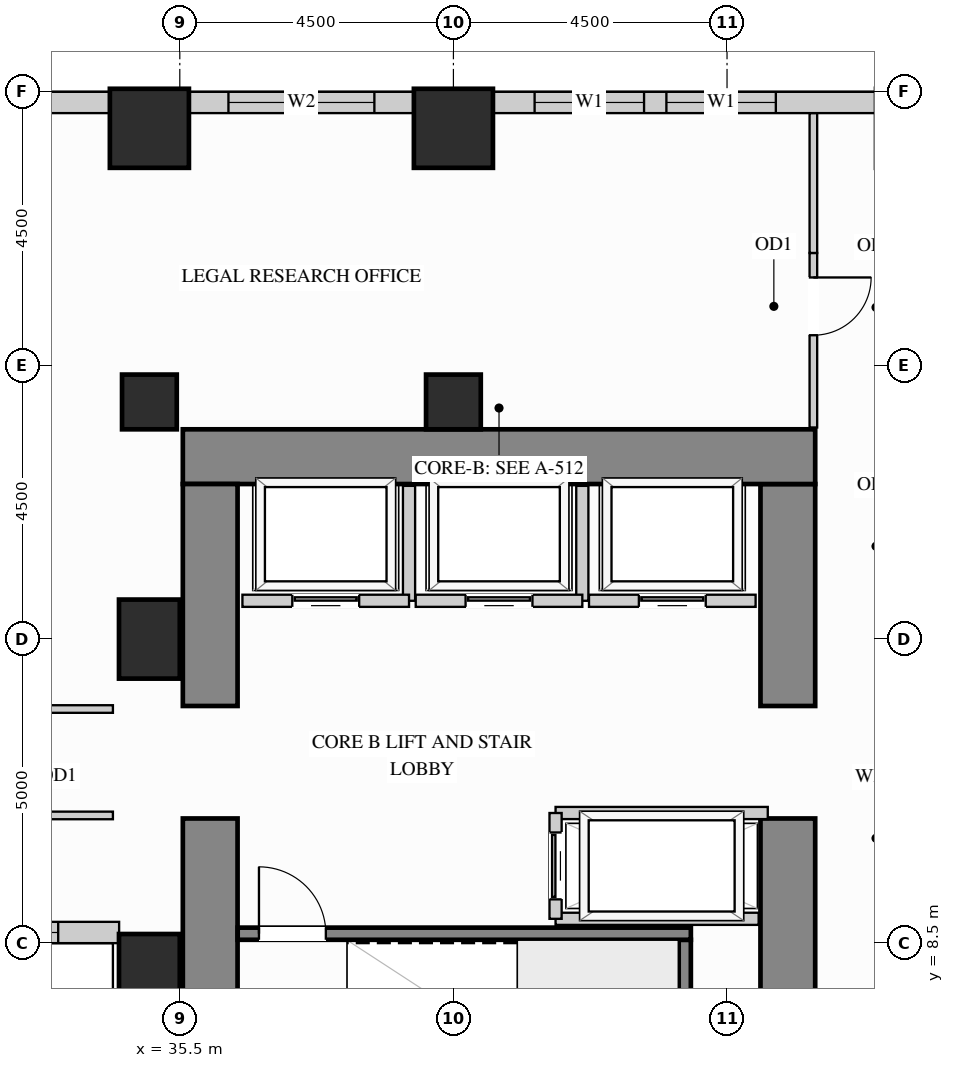
"""IFC4 building model, lengths in metres.
Left out: names, types, materials, properties, quantities, classifications, styles, units other than length and angle.
Written with IfcOpenShell. Run it as: python <this file> out.ifc"""

import sys

from ifc_helpers import new_model, si_unit, direction, frame, frame_2d, origin, origin_2d, place, context, subcontext, project, spatial, rectangle, extrude, source, transform, mapped, element, fill, save


model = new_model("IFC4")
c1 = context("Model", 3, precision=1e-05, world=origin(), true_north=direction((0.0, 1.0)))
c2 = subcontext(c1, "Body", "Model", "MODEL_VIEW")
j1 = project(units=[si_unit("LENGTHUNIT", "METRE"), si_unit("PLANEANGLEUNIT", "RADIAN")], contexts=[c1])
p1 = place(None, origin())
s1 = spatial("IfcSite", under=j1, at=p1, CompositionType="ELEMENT")
p2 = place(p1, origin())
s2 = spatial("IfcBuilding", under=s1, at=p2, CompositionType="ELEMENT")
p3 = place(p2, frame((0.0, 0.0, 51.3)))
s3 = spatial("IfcBuildingStorey", under=s2, at=p3, CompositionType="ELEMENT", Elevation=51.3)
m1 = source(origin(), c2, "Body", "SweptSolid", [
    extrude(rectangle(XDim=0.9, YDim=0.9, at=origin_2d()), origin(), (0.0, 0.0, 1.0), 3.38),
])
for number, where, z_axis, x_axis in (
    (1, (35.0, 17.4, 0.0), (0.0, 0.0, 1.0), (1.0, 0.0, 0.0)),
    (2, (40.0, 17.4, 0.0), (0.0, 0.0, 1.0), (1.0, 0.0, 0.0)),
):
    element("IfcColumn", number, at=place(p3, frame(where, z_axis=z_axis, x_axis=x_axis)), inside=s3, PredefinedType="COLUMN", context=c2, shape_type="MappedRepresentation", body=[
        mapped(m1, transform((0.0, 0.0, 0.0), x_axis=(1.0, 0.0, 0.0), y_axis=(0.0, 1.0, 0.0), z_axis=(0.0, 0.0, 1.0))),
    ])
m2 = source(origin(), c2, "Body", "SweptSolid", [
    extrude(rectangle(XDim=1.0, YDim=1.3, at=origin_2d()), origin(), (0.0, 0.0, 1.0), 3.38),
])
for number, where, z_axis, x_axis in (
    (3, (35.0, 13.5, 0.0), (0.0, 0.0, 1.0), (1.0, 0.0, 0.0)),
    (4, (35.0, 8.0, 0.0), (0.0, 0.0, 1.0), (1.0, 0.0, 0.0)),
):
    element("IfcColumn", number, at=place(p3, frame(where, z_axis=z_axis, x_axis=x_axis)), inside=s3, PredefinedType="COLUMN", context=c2, shape_type="MappedRepresentation", body=[
        mapped(m2, transform((0.0, 0.0, 0.0), x_axis=(1.0, 0.0, 0.0), y_axis=(0.0, 1.0, 0.0), z_axis=(0.0, 0.0, 1.0))),
    ])
m3 = source(origin(), c2, "Body", "SweptSolid", [
    extrude(rectangle(XDim=1.3, YDim=1.3, at=origin_2d()), origin(), (0.0, 0.0, 1.0), 3.38),
])
for number, where, z_axis, x_axis in (
    (5, (35.0, 21.9, 0.0), (0.0, 0.0, 1.0), (1.0, 0.0, 0.0)),
    (6, (40.0, 21.9, 0.0), (0.0, 0.0, 1.0), (1.0, 0.0, 0.0)),
):
    element("IfcColumn", number, at=place(p3, frame(where, z_axis=z_axis, x_axis=x_axis)), inside=s3, PredefinedType="COLUMN", context=c2, shape_type="MappedRepresentation", body=[
        mapped(m3, transform((0.0, 0.0, 0.0), x_axis=(1.0, 0.0, 0.0), y_axis=(0.0, 1.0, 0.0), z_axis=(0.0, 0.0, 1.0))),
    ])
m4 = source(origin(), c2, "Body", "SweptSolid", [
    extrude(rectangle(XDim=5.6, YDim=0.9, at=frame_2d((2.8, 0.0))), origin(), (0.0, 0.0, 1.0), 3.38),
])
p4 = place(p3, frame((45.5, 4.95, 0.0), z_axis=(0.0, 0.0, 1.0), x_axis=(0.0, 1.0, 0.0)))
e7 = element("IfcWall", 7, at=p4, inside=s3, PredefinedType="SHEAR", context=c2, shape_type="MappedRepresentation", body=[
    mapped(m4, transform((0.0, 0.0, 0.0), x_axis=(1.0, 0.0, 0.0), y_axis=(0.0, 1.0, 0.0), z_axis=(0.0, 0.0, 1.0))),
])
m5 = source(origin(), c2, "Body", "SweptSolid", [
    extrude(rectangle(XDim=3.65, YDim=0.9, at=frame_2d((1.825, 0.0))), origin(), (0.0, 0.0, 1.0), 3.38),
])
p5 = place(p3, frame((45.5, 12.4, 0.0), z_axis=(0.0, 0.0, 1.0), x_axis=(0.0, 1.0, 0.0)))
e8 = element("IfcWall", 8, at=p5, inside=s3, PredefinedType="SHEAR", context=c2, shape_type="MappedRepresentation", body=[
    mapped(m5, transform((0.0, 0.0, 0.0), x_axis=(1.0, 0.0, 0.0), y_axis=(0.0, 1.0, 0.0), z_axis=(0.0, 0.0, 1.0))),
])
m6 = source(origin(), c2, "Body", "SweptSolid", [
    extrude(rectangle(XDim=10.4, YDim=0.9, at=frame_2d((5.2, 0.0))), origin(), (0.0, 0.0, 1.0), 3.38),
])
p6 = place(p3, frame((35.55, 16.5, 0.0), z_axis=(0.0, 0.0, 1.0), x_axis=(1.0, 0.0, 0.0)))
e9 = element("IfcWall", 9, at=p6, inside=s3, PredefinedType="SHEAR", context=c2, shape_type="MappedRepresentation", body=[
    mapped(m6, transform((0.0, 0.0, 0.0), x_axis=(1.0, 0.0, 0.0), y_axis=(0.0, 1.0, 0.0), z_axis=(0.0, 0.0, 1.0))),
])
p7 = place(p3, frame((36.0, 4.95, 0.0), z_axis=(0.0, 0.0, 1.0), x_axis=(0.0, 1.0, 0.0)))
e10 = element("IfcWall", 10, at=p7, inside=s3, PredefinedType="SHEAR", context=c2, shape_type="MappedRepresentation", body=[
    mapped(m4, transform((0.0, 0.0, 0.0), x_axis=(1.0, 0.0, 0.0), y_axis=(0.0, 1.0, 0.0), z_axis=(0.0, 0.0, 1.0))),
])
p8 = place(p3, frame((36.0, 12.4, 0.0), z_axis=(0.0, 0.0, 1.0), x_axis=(0.0, 1.0, 0.0)))
e11 = element("IfcWall", 11, at=p8, inside=s3, PredefinedType="SHEAR", context=c2, shape_type="MappedRepresentation", body=[
    mapped(m5, transform((0.0, 0.0, 0.0), x_axis=(1.0, 0.0, 0.0), y_axis=(0.0, 1.0, 0.0), z_axis=(0.0, 0.0, 1.0))),
])
p9 = place(p3, frame((30.998, 8.675, 0.0), z_axis=(0.0, 0.0, 1.0), x_axis=(1.0, 0.0, 0.0)))
e12 = element("IfcWall", 12, at=p9, inside=s3, PredefinedType="SOLIDWALL", context=c2, shape_type="SweptSolid", body=[
    extrude(rectangle(XDim=3.504, YDim=0.35, at=frame_2d((1.752, 0.0))), origin(), (0.0, 0.0, 1.0), 3.365),
])
p10 = place(p9, frame((1.002, 0.0, 0.78)))
e13 = element("IfcOpeningElement", 13, at=p10, cuts=e12, PredefinedType="OPENING", context=c2, shape_type="SweptSolid", body=[
    extrude(rectangle(XDim=1.5, YDim=2.0, at=frame_2d((0.75, 1.0))), frame((0.0, 0.185, 0.0), z_axis=(0.0, -1.0, 0.0), x_axis=(1.0, 0.0, 0.0)), (0.0, 0.0, 1.0), 0.37),
])
p11 = place(p3, frame((46.952, 22.325, 0.0), z_axis=(0.0, 0.0, 1.0), x_axis=(-1.0, 0.0, 0.0)))
e14 = element("IfcWall", 14, at=p11, inside=s3, PredefinedType="SOLIDWALL", context=c2, shape_type="SweptSolid", body=[
    extrude(rectangle(XDim=6.304, YDim=0.35, at=frame_2d((3.152, 0.0))), origin(), (0.0, 0.0, 1.0), 2.51),
])
p12 = place(p11, frame((1.649, 0.0, 0.78)))
e15 = element("IfcOpeningElement", 15, at=p12, cuts=e14, PredefinedType="OPENING", context=c2, shape_type="SweptSolid", body=[
    extrude(rectangle(XDim=1.8, YDim=1.55, at=frame_2d((0.9, 0.775))), frame((0.0, 0.185, 0.0), z_axis=(0.0, -1.0, 0.0), x_axis=(1.0, 0.0, 0.0)), (0.0, 0.0, 1.0), 0.37),
])
p13 = place(p11, frame((3.817, 0.0, 0.78)))
e16 = element("IfcOpeningElement", 16, at=p13, cuts=e14, PredefinedType="OPENING", context=c2, shape_type="SweptSolid", body=[
    extrude(rectangle(XDim=1.8, YDim=1.55, at=frame_2d((0.9, 0.775))), frame((0.0, 0.185, 0.0), z_axis=(0.0, -1.0, 0.0), x_axis=(1.0, 0.0, 0.0)), (0.0, 0.0, 1.0), 0.37),
])
p14 = place(p3, frame((39.352, 22.325, 0.0), z_axis=(0.0, 0.0, 1.0), x_axis=(-1.0, 0.0, 0.0)))
e17 = element("IfcWall", 17, at=p14, inside=s3, PredefinedType="SOLIDWALL", context=c2, shape_type="SweptSolid", body=[
    extrude(rectangle(XDim=3.704, YDim=0.35, at=frame_2d((1.852, 0.0))), origin(), (0.0, 0.0, 1.0), 2.51),
])
p15 = place(p14, frame((0.652, 0.0, 0.78)))
e18 = element("IfcOpeningElement", 18, at=p15, cuts=e17, PredefinedType="OPENING", context=c2, shape_type="SweptSolid", body=[
    extrude(rectangle(XDim=2.4, YDim=1.55, at=frame_2d((1.2, 0.775))), frame((0.0, 0.185, 0.0), z_axis=(0.0, -1.0, 0.0), x_axis=(1.0, 0.0, 0.0)), (0.0, 0.0, 1.0), 0.37),
])
p16 = place(p3, frame((34.352, 22.325, 0.0), z_axis=(0.0, 0.0, 1.0), x_axis=(-1.0, 0.0, 0.0)))
e19 = element("IfcWall", 19, at=p16, inside=s3, PredefinedType="SOLIDWALL", context=c2, shape_type="SweptSolid", body=[
    extrude(rectangle(XDim=14.854, YDim=0.35, at=frame_2d((7.427, 0.0))), origin(), (0.0, 0.0, 1.0), 3.365),
])
p17 = place(p16, frame((4.058, 0.0, 0.78)))
e20 = element("IfcOpeningElement", 20, at=p17, cuts=e19, PredefinedType="OPENING", context=c2, shape_type="SweptSolid", body=[
    extrude(rectangle(XDim=1.5, YDim=2.0, at=frame_2d((0.75, 1.0))), frame((0.0, 0.185, 0.0), z_axis=(0.0, -1.0, 0.0), x_axis=(1.0, 0.0, 0.0)), (0.0, 0.0, 1.0), 0.37),
])
p18 = place(p16, frame((9.296, 0.0, 0.78)))
e21 = element("IfcOpeningElement", 21, at=p18, cuts=e19, PredefinedType="OPENING", context=c2, shape_type="SweptSolid", body=[
    extrude(rectangle(XDim=1.5, YDim=2.0, at=frame_2d((0.75, 1.0))), frame((0.0, 0.185, 0.0), z_axis=(0.0, -1.0, 0.0), x_axis=(1.0, 0.0, 0.0)), (0.0, 0.0, 1.0), 0.37),
])
p19 = place(p3, frame((45.92, 16.98, 0.0), z_axis=(0.0, 0.0, 1.0), x_axis=(0.0, 1.0, 0.0)))
e22 = element("IfcWall", 22, at=p19, inside=s3, PredefinedType="PARTITIONING", context=c2, shape_type="SweptSolid", body=[
    extrude(rectangle(XDim=2.87, YDim=0.125, at=frame_2d((1.435, 0.0))), origin(), (0.0, 0.0, 1.0), 3.365),
])
p20 = place(p19, frame((1.517, 0.0, 0.0)))
e23 = element("IfcOpeningElement", 23, at=p20, cuts=e22, PredefinedType="OPENING", context=c2, shape_type="SweptSolid", body=[
    extrude(rectangle(XDim=0.95, YDim=2.15, at=frame_2d((0.475, 1.075))), frame((0.0, 0.073, 0.0), z_axis=(0.0, -1.0, 0.0), x_axis=(1.0, 0.0, 0.0)), (0.0, 0.0, 1.0), 0.145),
])
m7 = source(origin(), c2, "Body", "SweptSolid", [
    extrude(rectangle(XDim=2.298, YDim=0.125, at=frame_2d((1.149, 0.0))), origin(), (0.0, 0.0, 1.0), 3.365),
])
p21 = place(p3, frame((45.92, 19.85, 0.0), z_axis=(0.0, 0.0, 1.0), x_axis=(0.0, 1.0, 0.0)))
e24 = element("IfcWall", 24, at=p21, inside=s3, PredefinedType="PARTITIONING", context=c2, shape_type="MappedRepresentation", body=[
    mapped(m7, transform((0.0, 0.0, 0.0), x_axis=(1.0, 0.0, 0.0), y_axis=(0.0, 1.0, 0.0), z_axis=(0.0, 0.0, 1.0))),
])
p22 = place(p3, frame((29.85, 12.35, 0.0), z_axis=(0.0, 0.0, 1.0), x_axis=(1.0, 0.0, 0.0)))
e25 = element("IfcWall", 25, at=p22, inside=s3, PredefinedType="PARTITIONING", context=c2, shape_type="SweptSolid", body=[
    extrude(rectangle(XDim=4.55, YDim=0.125, at=frame_2d((2.275, 0.0))), origin(), (0.0, 0.0, 1.0), 3.365),
])
p23 = place(p22, frame((1.8, 0.0, 0.0)))
e26 = element("IfcOpeningElement", 26, at=p23, cuts=e25, PredefinedType="OPENING", context=c2, shape_type="SweptSolid", body=[
    extrude(rectangle(XDim=0.95, YDim=2.15, at=frame_2d((0.475, 1.075))), frame((0.0, 0.073, 0.0), z_axis=(0.0, -1.0, 0.0), x_axis=(1.0, 0.0, 0.0)), (0.0, 0.0, 1.0), 0.145),
])
p24 = place(p3, frame((29.85, 10.6, 0.0), z_axis=(0.0, 0.0, 1.0), x_axis=(1.0, 0.0, 0.0)))
e27 = element("IfcWall", 27, at=p24, inside=s3, PredefinedType="PARTITIONING", context=c2, shape_type="SweptSolid", body=[
    extrude(rectangle(XDim=4.55, YDim=0.125, at=frame_2d((2.275, 0.0))), origin(), (0.0, 0.0, 1.0), 3.365),
])
p25 = place(p24, frame((1.8, 0.0, 0.0)))
e28 = element("IfcOpeningElement", 28, at=p25, cuts=e27, PredefinedType="OPENING", context=c2, shape_type="SweptSolid", body=[
    extrude(rectangle(XDim=0.95, YDim=2.15, at=frame_2d((0.475, 1.075))), frame((0.0, 0.073, 0.0), z_axis=(0.0, -1.0, 0.0), x_axis=(1.0, 0.0, 0.0)), (0.0, 0.0, 1.0), 0.145),
])
m8 = source(origin(), c2, "Body", "SweptSolid", [
    extrude(rectangle(XDim=1.89, YDim=0.2, at=frame_2d((0.945, 0.0))), origin(), (0.0, 0.0, 1.0), 3.365),
])
p26 = place(p3, frame((39.27, 14.13, 0.0), z_axis=(0.0, 0.0, 1.0), x_axis=(0.0, 1.0, 0.0)))
e29 = element("IfcWall", 29, at=p26, inside=s3, PredefinedType="PARTITIONING", context=c2, shape_type="MappedRepresentation", body=[
    mapped(m8, transform((0.0, 0.0, 0.0), x_axis=(1.0, 0.0, 0.0), y_axis=(0.0, 1.0, 0.0), z_axis=(0.0, 0.0, 1.0))),
])
p27 = place(p3, frame((36.53, 14.13, 0.0), z_axis=(0.0, 0.0, 1.0), x_axis=(1.0, 0.0, 0.0)))
e30 = element("IfcWall", 30, at=p27, inside=s3, PredefinedType="PARTITIONING", context=c2, shape_type="SweptSolid", body=[
    extrude(rectangle(XDim=2.74, YDim=0.2, at=frame_2d((1.37, 0.0))), origin(), (0.0, 0.0, 1.0), 3.365),
])
p28 = place(p27, frame((0.82, 0.0, 0.0)))
e31 = element("IfcOpeningElement", 31, at=p28, cuts=e30, PredefinedType="OPENING", context=c2, shape_type="SweptSolid", body=[
    extrude(rectangle(XDim=1.1, YDim=2.2, at=frame_2d((0.55, 1.1))), frame((0.0, 0.11, 0.0), z_axis=(0.0, -1.0, 0.0), x_axis=(1.0, 0.0, 0.0)), (0.0, 0.0, 1.0), 0.22),
])
p29 = place(p3, frame((42.12, 14.13, 0.0), z_axis=(0.0, 0.0, 1.0), x_axis=(0.0, 1.0, 0.0)))
e32 = element("IfcWall", 32, at=p29, inside=s3, PredefinedType="PARTITIONING", context=c2, shape_type="MappedRepresentation", body=[
    mapped(m8, transform((0.0, 0.0, 0.0), x_axis=(1.0, 0.0, 0.0), y_axis=(0.0, 1.0, 0.0), z_axis=(0.0, 0.0, 1.0))),
])
p30 = place(p3, frame((39.38, 14.13, 0.0), z_axis=(0.0, 0.0, 1.0), x_axis=(1.0, 0.0, 0.0)))
e33 = element("IfcWall", 33, at=p30, inside=s3, PredefinedType="PARTITIONING", context=c2, shape_type="SweptSolid", body=[
    extrude(rectangle(XDim=2.74, YDim=0.2, at=frame_2d((1.37, 0.0))), origin(), (0.0, 0.0, 1.0), 3.365),
])
p31 = place(p30, frame((0.82, 0.0, 0.0)))
e34 = element("IfcOpeningElement", 34, at=p31, cuts=e33, PredefinedType="OPENING", context=c2, shape_type="SweptSolid", body=[
    extrude(rectangle(XDim=1.1, YDim=2.2, at=frame_2d((0.55, 1.1))), frame((0.0, 0.11, 0.0), z_axis=(0.0, -1.0, 0.0), x_axis=(1.0, 0.0, 0.0)), (0.0, 0.0, 1.0), 0.22),
])
p32 = place(p3, frame((42.23, 14.13, 0.0), z_axis=(0.0, 0.0, 1.0), x_axis=(1.0, 0.0, 0.0)))
e35 = element("IfcWall", 35, at=p32, inside=s3, PredefinedType="PARTITIONING", context=c2, shape_type="SweptSolid", body=[
    extrude(rectangle(XDim=2.74, YDim=0.2, at=frame_2d((1.37, 0.0))), origin(), (0.0, 0.0, 1.0), 3.365),
])
p33 = place(p32, frame((0.82, 0.0, 0.0)))
e36 = element("IfcOpeningElement", 36, at=p33, cuts=e35, PredefinedType="OPENING", context=c2, shape_type="SweptSolid", body=[
    extrude(rectangle(XDim=1.1, YDim=2.2, at=frame_2d((0.55, 1.1))), frame((0.0, 0.11, 0.0), z_axis=(0.0, -1.0, 0.0), x_axis=(1.0, 0.0, 0.0)), (0.0, 0.0, 1.0), 0.22),
])
m9 = source(origin(), c2, "Body", "SweptSolid", [
    extrude(rectangle(XDim=3.49, YDim=0.2, at=frame_2d((1.745, 0.0))), origin(), (0.0, 0.0, 1.0), 3.365),
])
p34 = place(p3, frame((41.68, 10.64, 0.0), z_axis=(0.0, 0.0, 1.0), x_axis=(1.0, 0.0, 0.0)))
e37 = element("IfcWall", 37, at=p34, inside=s3, PredefinedType="PARTITIONING", context=c2, shape_type="MappedRepresentation", body=[
    mapped(m9, transform((0.0, 0.0, 0.0), x_axis=(1.0, 0.0, 0.0), y_axis=(0.0, 1.0, 0.0), z_axis=(0.0, 0.0, 1.0))),
])
m10 = source(origin(), c2, "Body", "SweptSolid", [
    extrude(rectangle(XDim=3.34, YDim=0.2, at=frame_2d((1.67, 0.0))), origin(), (0.0, 0.0, 1.0), 3.365),
])
p35 = place(p3, frame((41.68, 8.9, 0.0), z_axis=(0.0, 0.0, 1.0), x_axis=(1.0, 0.0, 0.0)))
e38 = element("IfcWall", 38, at=p35, inside=s3, PredefinedType="PARTITIONING", context=c2, shape_type="MappedRepresentation", body=[
    mapped(m10, transform((0.0, 0.0, 0.0), x_axis=(1.0, 0.0, 0.0), y_axis=(0.0, 1.0, 0.0), z_axis=(0.0, 0.0, 1.0))),
])
p36 = place(p3, frame((41.68, 8.9, 0.0), z_axis=(0.0, 0.0, 1.0), x_axis=(0.0, 1.0, 0.0)))
e39 = element("IfcWall", 39, at=p36, inside=s3, PredefinedType="PARTITIONING", context=c2, shape_type="SweptSolid", body=[
    extrude(rectangle(XDim=1.74, YDim=0.2, at=frame_2d((0.87, 0.0))), origin(), (0.0, 0.0, 1.0), 3.365),
])
p37 = place(p36, frame((0.32, 0.0, 0.0)))
e40 = element("IfcOpeningElement", 40, at=p37, cuts=e39, PredefinedType="OPENING", context=c2, shape_type="SweptSolid", body=[
    extrude(rectangle(XDim=1.1, YDim=2.2, at=frame_2d((0.55, 1.1))), frame((0.0, 0.11, 0.0), z_axis=(0.0, -1.0, 0.0), x_axis=(1.0, 0.0, 0.0)), (0.0, 0.0, 1.0), 0.22),
])
m11 = source(origin(), c2, "Body", "SweptSolid", [
    extrude(rectangle(XDim=3.603, YDim=0.2, at=frame_2d((1.802, 0.0))), origin(), (0.0, 0.0, 1.0), 3.38),
])
p38 = place(p3, frame((43.805, 4.952, 0.0), z_axis=(0.0, 0.0, 1.0), x_axis=(0.0, 1.0, 0.0)))
e41 = element("IfcWall", 41, at=p38, inside=s3, PredefinedType="SHEAR", context=c2, shape_type="MappedRepresentation", body=[
    mapped(m11, transform((0.0, 0.0, 0.0), x_axis=(1.0, 0.0, 0.0), y_axis=(0.0, 1.0, 0.0), z_axis=(0.0, 0.0, 1.0))),
])
p39 = place(p3, frame((36.452, 8.655, 0.0), z_axis=(0.0, 0.0, 1.0), x_axis=(1.0, 0.0, 0.0)))
e42 = element("IfcWall", 42, at=p39, inside=s3, PredefinedType="SHEAR", context=c2, shape_type="SweptSolid", body=[
    extrude(rectangle(XDim=7.453, YDim=0.2, at=frame_2d((3.727, 0.0))), origin(), (0.0, 0.0, 1.0), 3.38),
])
p40 = place(p39, frame((0.35, 0.0, 0.0)))
e43 = element("IfcOpeningElement", 43, at=p40, cuts=e42, PredefinedType="OPENING", context=c2, shape_type="SweptSolid", body=[
    extrude(rectangle(XDim=1.1, YDim=2.15, at=frame_2d((0.55, 1.075))), frame((0.0, 0.11, 0.0), z_axis=(0.0, -1.0, 0.0), x_axis=(1.0, 0.0, 0.0)), (0.0, 0.0, 1.0), 0.22),
])
m12 = source(origin(), c2, "Body", "SweptSolid", [
    extrude(rectangle(XDim=1.1, YDim=2.2, at=frame_2d((0.55, 1.1))), frame((0.0, 0.025, 0.0), z_axis=(0.0, -1.0, 0.0), x_axis=(1.0, 0.0, 0.0)), (0.0, 0.0, 1.0), 0.05),
])
p41 = place(p28, origin())
e44 = element("IfcDoor", 44, at=p41, inside=s3, OperationType="SLIDING_TO_LEFT", PredefinedType="DOOR", context=c2, shape_type="MappedRepresentation", body=[
    mapped(m12, transform((0.0, 0.0, 0.0), x_axis=(1.0, 0.0, 0.0), y_axis=(0.0, 1.0, 0.0), z_axis=(0.0, 0.0, 1.0))),
])
fill(e31, e44)
p42 = place(p31, origin())
e45 = element("IfcDoor", 45, at=p42, inside=s3, OperationType="SLIDING_TO_LEFT", PredefinedType="DOOR", context=c2, shape_type="MappedRepresentation", body=[
    mapped(m12, transform((0.0, 0.0, 0.0), x_axis=(1.0, 0.0, 0.0), y_axis=(0.0, 1.0, 0.0), z_axis=(0.0, 0.0, 1.0))),
])
fill(e34, e45)
p43 = place(p33, origin())
e46 = element("IfcDoor", 46, at=p43, inside=s3, OperationType="SLIDING_TO_LEFT", PredefinedType="DOOR", context=c2, shape_type="MappedRepresentation", body=[
    mapped(m12, transform((0.0, 0.0, 0.0), x_axis=(1.0, 0.0, 0.0), y_axis=(0.0, 1.0, 0.0), z_axis=(0.0, 0.0, 1.0))),
])
fill(e36, e46)
p44 = place(p37, origin())
e47 = element("IfcDoor", 47, at=p44, inside=s3, OperationType="SLIDING_TO_LEFT", PredefinedType="DOOR", context=c2, shape_type="MappedRepresentation", body=[
    mapped(m12, transform((0.0, 0.0, 0.0), x_axis=(1.0, 0.0, 0.0), y_axis=(0.0, 1.0, 0.0), z_axis=(0.0, 0.0, 1.0))),
])
fill(e40, e47)
m13 = source(origin(), c2, "Body", "SweptSolid", [
    extrude(rectangle(XDim=0.95, YDim=2.15, at=frame_2d((0.475, 1.075))), frame((0.0, 0.025, 0.0), z_axis=(0.0, -1.0, 0.0), x_axis=(1.0, 0.0, 0.0)), (0.0, 0.0, 1.0), 0.05),
])
p45 = place(p20, origin())
e48 = element("IfcDoor", 48, at=p45, inside=s3, OperationType="SINGLE_SWING_RIGHT", PredefinedType="DOOR", context=c2, shape_type="MappedRepresentation", body=[
    mapped(m13, transform((0.0, 0.0, 0.0), x_axis=(1.0, 0.0, 0.0), y_axis=(0.0, 1.0, 0.0), z_axis=(0.0, 0.0, 1.0))),
])
fill(e23, e48)
m14 = source(origin(), c2, "Body", "SweptSolid", [
    extrude(rectangle(XDim=1.1, YDim=2.15, at=frame_2d((0.55, 1.075))), frame((0.0, 0.025, 0.0), z_axis=(0.0, -1.0, 0.0), x_axis=(1.0, 0.0, 0.0)), (0.0, 0.0, 1.0), 0.05),
])
p46 = place(p40, origin())
e49 = element("IfcDoor", 49, at=p46, inside=s3, OperationType="SINGLE_SWING_LEFT", PredefinedType="DOOR", context=c2, shape_type="MappedRepresentation", body=[
    mapped(m14, transform((0.0, 0.0, 0.0), x_axis=(1.0, 0.0, 0.0), y_axis=(0.0, 1.0, 0.0), z_axis=(0.0, 0.0, 1.0))),
])
fill(e43, e49)
m15 = source(origin(), c2, "Body", "SweptSolid", [
    extrude(rectangle(XDim=1.8, YDim=1.55, at=frame_2d((0.9, 0.775))), frame((0.0, 0.03, 0.0), z_axis=(0.0, -1.0, 0.0), x_axis=(1.0, 0.0, 0.0)), (0.0, 0.0, 1.0), 0.06),
])
p47 = place(p12, origin())
e50 = element("IfcWindow", 50, at=p47, inside=s3, PartitioningType="SINGLE_PANEL", PredefinedType="WINDOW", context=c2, shape_type="MappedRepresentation", body=[
    mapped(m15, transform((0.0, 0.0, 0.0), x_axis=(1.0, 0.0, 0.0), y_axis=(0.0, 1.0, 0.0), z_axis=(0.0, 0.0, 1.0))),
])
fill(e15, e50)
p48 = place(p13, origin())
e51 = element("IfcWindow", 51, at=p48, inside=s3, PartitioningType="SINGLE_PANEL", PredefinedType="WINDOW", context=c2, shape_type="MappedRepresentation", body=[
    mapped(m15, transform((0.0, 0.0, 0.0), x_axis=(1.0, 0.0, 0.0), y_axis=(0.0, 1.0, 0.0), z_axis=(0.0, 0.0, 1.0))),
])
fill(e16, e51)
m16 = source(origin(), c2, "Body", "SweptSolid", [
    extrude(rectangle(XDim=2.4, YDim=1.55, at=frame_2d((1.2, 0.775))), frame((0.0, 0.03, 0.0), z_axis=(0.0, -1.0, 0.0), x_axis=(1.0, 0.0, 0.0)), (0.0, 0.0, 1.0), 0.06),
])
p49 = place(p15, origin())
e52 = element("IfcWindow", 52, at=p49, inside=s3, PartitioningType="SINGLE_PANEL", PredefinedType="WINDOW", context=c2, shape_type="MappedRepresentation", body=[
    mapped(m16, transform((0.0, 0.0, 0.0), x_axis=(1.0, 0.0, 0.0), y_axis=(0.0, 1.0, 0.0), z_axis=(0.0, 0.0, 1.0))),
])
fill(e18, e52)
m17 = source(origin(), c2, "Body", "SweptSolid", [
    extrude(rectangle(XDim=1.5, YDim=2.0, at=frame_2d((0.75, 1.0))), frame((0.0, 0.03, 0.0), z_axis=(0.0, -1.0, 0.0), x_axis=(1.0, 0.0, 0.0)), (0.0, 0.0, 1.0), 0.06),
])
p50 = place(p10, origin())
e53 = element("IfcWindow", 53, at=p50, inside=s3, PartitioningType="SINGLE_PANEL", PredefinedType="WINDOW", context=c2, shape_type="MappedRepresentation", body=[
    mapped(m17, transform((0.0, 0.0, 0.0), x_axis=(1.0, 0.0, 0.0), y_axis=(0.0, 1.0, 0.0), z_axis=(0.0, 0.0, 1.0))),
])
fill(e13, e53)
save(model, sys.argv[1])
